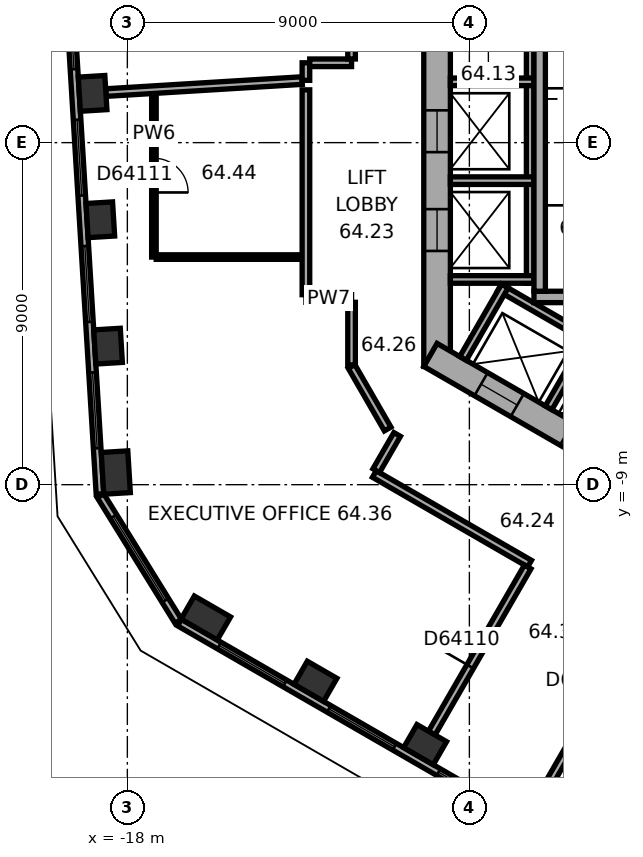
"""IFC4 building model, lengths in metres.
Left out: names, types, materials, properties, quantities, classifications, styles, units other than length and angle.
Written with IfcOpenShell. Run it as: python <this file> out.ifc"""

import sys

from ifc_helpers import new_model, si_unit, direction, frame, frame_2d, origin, origin_2d, place, context, subcontext, project, spatial, rectangle, extrude, element, fill, save


model = new_model("IFC4")
c1 = context("Model", 3, precision=1e-05, world=origin(), true_north=direction((0.0, 1.0)))
c2 = subcontext(c1, "Body", "Model", "MODEL_VIEW")
j1 = project(units=[si_unit("LENGTHUNIT", "METRE"), si_unit("PLANEANGLEUNIT", "RADIAN")], contexts=[c1])
p1 = place(None, origin())
s1 = spatial("IfcSite", under=j1, at=p1, CompositionType="ELEMENT")
p2 = place(p1, origin())
s2 = spatial("IfcBuilding", under=s1, at=p2, CompositionType="ELEMENT")
p3 = place(p2, frame((0.0, 0.0, 259.8)))
s3 = spatial("IfcBuildingStorey", under=s2, at=p3, CompositionType="ELEMENT", Elevation=259.8)
for number, where, z_axis, x_axis in (
    (1, (-18.914, 1.296, 0.0), (0.0, 0.0, 1.0), (0.061, -0.998, 0.0)),
    (2, (-18.711, -2.03, 0.0), (0.0, 0.0, 1.0), (0.061, -0.998, 0.0)),
    (3, (-18.508, -5.355, 0.0), (0.0, 0.0, 1.0), (0.061, -0.998, 0.0)),
):
    element("IfcColumn", number, at=place(p3, frame(where, z_axis=z_axis, x_axis=x_axis)), inside=s3, PredefinedType="COLUMN", context=c2, shape_type="SweptSolid", body=[
        extrude(rectangle(XDim=0.9, YDim=0.7, at=origin_2d()), origin(), (0.0, 0.0, 1.0), 3.7),
    ])
for number, where, z_axis, x_axis in (
    (4, (-18.304, -8.68, 0.0), (0.0, 0.0, 1.0), (0.061, -0.998, 0.0)),
    (5, (-15.936, -12.508, 0.0), (0.0, 0.0, 1.0), (0.866, -0.5, 0.0)),
):
    element("IfcColumn", number, at=place(p3, frame(where, z_axis=z_axis, x_axis=x_axis)), inside=s3, PredefinedType="COLUMN", context=c2, shape_type="SweptSolid", body=[
        extrude(rectangle(XDim=1.1, YDim=0.7, at=origin_2d()), origin(), (0.0, 0.0, 1.0), 3.7),
    ])
for number, where, z_axis, x_axis in (
    (6, (-13.05, -14.174, 0.0), (0.0, 0.0, 1.0), (0.866, -0.5, 0.0)),
    (7, (-10.165, -15.84, 0.0), (0.0, 0.0, 1.0), (0.866, -0.5, 0.0)),
):
    element("IfcColumn", number, at=place(p3, frame(where, z_axis=z_axis, x_axis=x_axis)), inside=s3, PredefinedType="COLUMN", context=c2, shape_type="SweptSolid", body=[
        extrude(rectangle(XDim=0.9, YDim=0.7, at=origin_2d()), origin(), (0.0, 0.0, 1.0), 3.7),
    ])
p4 = place(p3, frame((-9.85, 5.889, 0.0), z_axis=(0.0, 0.0, 1.0), x_axis=(0.0, -1.0, 0.0)))
e8 = element("IfcWall", 8, at=p4, inside=s3, PredefinedType="SHEAR", context=c2, shape_type="SweptSolid", body=[
    extrude(rectangle(XDim=11.778, YDim=0.7, at=frame_2d((5.889, 0.0))), origin(), (0.0, 0.0, 1.0), 3.7),
])
p5 = place(p4, frame((5.039, 0.0, 0.0)))
e9 = element("IfcOpeningElement", 9, at=p5, cuts=e8, PredefinedType="OPENING", context=c2, shape_type="SweptSolid", body=[
    extrude(rectangle(XDim=1.1, YDim=2.1, at=frame_2d((0.55, 1.05))), frame((0.0, 0.36, 0.0), z_axis=(0.0, -1.0, 0.0), x_axis=(1.0, 0.0, 0.0)), (0.0, 0.0, 1.0), 0.72),
])
p6 = place(p4, frame((7.639, 0.0, 0.0)))
e10 = element("IfcOpeningElement", 10, at=p6, cuts=e8, PredefinedType="OPENING", context=c2, shape_type="SweptSolid", body=[
    extrude(rectangle(XDim=1.1, YDim=2.1, at=frame_2d((0.55, 1.05))), frame((0.0, 0.36, 0.0), z_axis=(0.0, -1.0, 0.0), x_axis=(1.0, 0.0, 0.0)), (0.0, 0.0, 1.0), 0.72),
])
p7 = place(p3, frame((-10.025, -5.586, 0.0), z_axis=(0.0, 0.0, 1.0), x_axis=(0.866026453023, -0.499998182661, 0.0)))
e11 = element("IfcWall", 11, at=p7, inside=s3, PredefinedType="SHEAR", context=c2, shape_type="SweptSolid", body=[
    extrude(rectangle(XDim=11.778, YDim=0.7, at=frame_2d((5.889, 0.0))), origin(), (0.0, 0.0, 1.0), 3.7),
])
p8 = place(p7, frame((6.089, 0.0, 0.0)))
e12 = element("IfcOpeningElement", 12, at=p8, cuts=e11, PredefinedType="OPENING", context=c2, shape_type="SweptSolid", body=[
    extrude(rectangle(XDim=1.5, YDim=2.1, at=frame_2d((0.75, 1.05))), frame((0.0, 0.36, 0.0), z_axis=(0.0, -1.0, 0.0), x_axis=(1.0, 0.0, 0.0)), (0.0, 0.0, 1.0), 0.72),
])
p9 = place(p7, frame((1.539, 0.0, 0.0)))
e13 = element("IfcOpeningElement", 13, at=p9, cuts=e11, PredefinedType="OPENING", context=c2, shape_type="SweptSolid", body=[
    extrude(rectangle(XDim=1.1, YDim=2.1, at=frame_2d((0.55, 1.05))), frame((0.0, 0.36, 0.0), z_axis=(0.0, -1.0, 0.0), x_axis=(1.0, 0.0, 0.0)), (0.0, 0.0, 1.0), 0.72),
])
p10 = place(p7, frame((4.139, 0.0, 0.0)))
e14 = element("IfcOpeningElement", 14, at=p10, cuts=e11, PredefinedType="OPENING", context=c2, shape_type="SweptSolid", body=[
    extrude(rectangle(XDim=1.1, YDim=2.1, at=frame_2d((0.55, 1.05))), frame((0.0, 0.36, 0.0), z_axis=(0.0, -1.0, 0.0), x_axis=(1.0, 0.0, 0.0)), (0.0, 0.0, 1.0), 0.72),
])
p11 = place(p3, frame((-19.803, 8.454, 0.0), z_axis=(0.0, 0.0, 1.0), x_axis=(0.061036717565, -0.998135521414, 0.0)))
e15 = element("IfcWall", 15, at=p11, inside=s3, PredefinedType="STANDARD", context=c2, shape_type="SweptSolid", body=[
    extrude(rectangle(XDim=17.731, YDim=0.2, at=frame_2d((8.866, 0.0))), origin(), (0.0, 0.0, 1.0), 3.7),
])
p12 = place(p11, frame((1.202, 0.0, 0.9)))
e16 = element("IfcOpeningElement", 16, at=p12, cuts=e15, PredefinedType="OPENING", context=c2, shape_type="SweptSolid", body=[
    extrude(rectangle(XDim=2.0, YDim=2.0, at=frame_2d((1.0, 1.0))), frame((0.0, 0.11, 0.0), z_axis=(0.0, -1.0, 0.0), x_axis=(1.0, 0.0, 0.0)), (0.0, 0.0, 1.0), 0.22),
])
p13 = place(p11, frame((4.533, 0.0, 0.9)))
e17 = element("IfcOpeningElement", 17, at=p13, cuts=e15, PredefinedType="OPENING", context=c2, shape_type="SweptSolid", body=[
    extrude(rectangle(XDim=2.0, YDim=2.0, at=frame_2d((1.0, 1.0))), frame((0.0, 0.11, 0.0), z_axis=(0.0, -1.0, 0.0), x_axis=(1.0, 0.0, 0.0)), (0.0, 0.0, 1.0), 0.22),
])
p14 = place(p11, frame((7.865, 0.0, 0.9)))
e18 = element("IfcOpeningElement", 18, at=p14, cuts=e15, PredefinedType="OPENING", context=c2, shape_type="SweptSolid", body=[
    extrude(rectangle(XDim=2.0, YDim=2.0, at=frame_2d((1.0, 1.0))), frame((0.0, 0.11, 0.0), z_axis=(0.0, -1.0, 0.0), x_axis=(1.0, 0.0, 0.0)), (0.0, 0.0, 1.0), 0.22),
])
p15 = place(p11, frame((11.197, 0.0, 0.9)))
e19 = element("IfcOpeningElement", 19, at=p15, cuts=e15, PredefinedType="OPENING", context=c2, shape_type="SweptSolid", body=[
    extrude(rectangle(XDim=2.0, YDim=2.0, at=frame_2d((1.0, 1.0))), frame((0.0, 0.11, 0.0), z_axis=(0.0, -1.0, 0.0), x_axis=(1.0, 0.0, 0.0)), (0.0, 0.0, 1.0), 0.22),
])
p16 = place(p11, frame((14.528, 0.0, 0.9)))
e20 = element("IfcOpeningElement", 20, at=p16, cuts=e15, PredefinedType="OPENING", context=c2, shape_type="SweptSolid", body=[
    extrude(rectangle(XDim=2.0, YDim=2.0, at=frame_2d((1.0, 1.0))), frame((0.0, 0.11, 0.0), z_axis=(0.0, -1.0, 0.0), x_axis=(1.0, 0.0, 0.0)), (0.0, 0.0, 1.0), 0.22),
])
p17 = place(p3, frame((-18.706, -9.291, 0.0), z_axis=(0.0, 0.0, 1.0), x_axis=(0.526209683648, -0.850354848775, 0.0)))
e21 = element("IfcWall", 21, at=p17, inside=s3, PredefinedType="STANDARD", context=c2, shape_type="SweptSolid", body=[
    extrude(rectangle(XDim=3.886, YDim=0.2, at=frame_2d((1.943, 0.0))), origin(), (0.0, 0.0, 1.0), 3.7),
])
p18 = place(p17, frame((0.643, 0.0, 0.9)))
e22 = element("IfcOpeningElement", 22, at=p18, cuts=e21, PredefinedType="OPENING", context=c2, shape_type="SweptSolid", body=[
    extrude(rectangle(XDim=2.6, YDim=2.0, at=frame_2d((1.3, 1.0))), frame((0.0, 0.11, 0.0), z_axis=(0.0, -1.0, 0.0), x_axis=(1.0, 0.0, 0.0)), (0.0, 0.0, 1.0), 0.22),
])
p19 = place(p3, frame((-16.626, -12.629, 0.0), z_axis=(0.0, 0.0, 1.0), x_axis=(0.866026460444, -0.499998169808, 0.0)))
e23 = element("IfcWall", 23, at=p19, inside=s3, PredefinedType="STANDARD", context=c2, shape_type="SweptSolid", body=[
    extrude(rectangle(XDim=17.731, YDim=0.2, at=frame_2d((8.866, 0.0))), origin(), (0.0, 0.0, 1.0), 3.7),
])
p20 = place(p19, frame((1.203, 0.0, 0.9)))
e24 = element("IfcOpeningElement", 24, at=p20, cuts=e23, PredefinedType="OPENING", context=c2, shape_type="SweptSolid", body=[
    extrude(rectangle(XDim=2.0, YDim=2.0, at=frame_2d((1.0, 1.0))), frame((0.0, 0.11, 0.0), z_axis=(0.0, -1.0, 0.0), x_axis=(1.0, 0.0, 0.0)), (0.0, 0.0, 1.0), 0.22),
])
p21 = place(p19, frame((4.535, 0.0, 0.9)))
e25 = element("IfcOpeningElement", 25, at=p21, cuts=e23, PredefinedType="OPENING", context=c2, shape_type="SweptSolid", body=[
    extrude(rectangle(XDim=2.0, YDim=2.0, at=frame_2d((1.0, 1.0))), frame((0.0, 0.11, 0.0), z_axis=(0.0, -1.0, 0.0), x_axis=(1.0, 0.0, 0.0)), (0.0, 0.0, 1.0), 0.22),
])
p22 = place(p19, frame((7.867, 0.0, 0.9)))
e26 = element("IfcOpeningElement", 26, at=p22, cuts=e23, PredefinedType="OPENING", context=c2, shape_type="SweptSolid", body=[
    extrude(rectangle(XDim=2.0, YDim=2.0, at=frame_2d((1.0, 1.0))), frame((0.0, 0.11, 0.0), z_axis=(0.0, -1.0, 0.0), x_axis=(1.0, 0.0, 0.0)), (0.0, 0.0, 1.0), 0.22),
])
p23 = place(p19, frame((11.198, 0.0, 0.9)))
e27 = element("IfcOpeningElement", 27, at=p23, cuts=e23, PredefinedType="OPENING", context=c2, shape_type="SweptSolid", body=[
    extrude(rectangle(XDim=2.0, YDim=2.0, at=frame_2d((1.0, 1.0))), frame((0.0, 0.11, 0.0), z_axis=(0.0, -1.0, 0.0), x_axis=(1.0, 0.0, 0.0)), (0.0, 0.0, 1.0), 0.22),
])
p24 = place(p19, frame((14.53, 0.0, 0.9)))
e28 = element("IfcOpeningElement", 28, at=p24, cuts=e23, PredefinedType="OPENING", context=c2, shape_type="SweptSolid", body=[
    extrude(rectangle(XDim=2.0, YDim=2.0, at=frame_2d((1.0, 1.0))), frame((0.0, 0.11, 0.0), z_axis=(0.0, -1.0, 0.0), x_axis=(1.0, 0.0, 0.0)), (0.0, 0.0, 1.0), 0.22),
])
p25 = place(p3, frame((-7.4, 4.3, 0.0), z_axis=(0.0, 0.0, 1.0), x_axis=(0.0, -1.0, 0.0)))
e29 = element("IfcWall", 29, at=p25, inside=s3, PredefinedType="PARTITIONING", context=c2, shape_type="SweptSolid", body=[
    extrude(rectangle(XDim=8.0, YDim=0.2, at=frame_2d((4.0, 0.0))), origin(), (0.0, 0.0, 1.0), 3.42),
])
for number, where, z_axis, x_axis in (
    (30, (-7.3, 1.6, 0.0), (0.0, 0.0, 1.0), (-1.0, 0.0, 0.0)),
    (31, (-7.3, -1.0, 0.0), (0.0, 0.0, 1.0), (-1.0, 0.0, 0.0)),
    (32, (-7.3, -3.6, 0.0), (0.0, 0.0, 1.0), (-1.0, 0.0, 0.0)),
):
    element("IfcWall", number, at=place(p3, frame(where, z_axis=z_axis, x_axis=x_axis)), inside=s3, PredefinedType="PARTITIONING", context=c2, shape_type="SweptSolid", body=[
        extrude(rectangle(XDim=2.2, YDim=0.2, at=frame_2d((1.1, 0.0))), origin(), (0.0, 0.0, 1.0), 3.42),
    ])
p26 = place(p3, frame((-8.203, -3.809, 0.0), z_axis=(0.0, 0.0, 1.0), x_axis=(0.866028230842, -0.499995103361, 0.0)))
e33 = element("IfcWall", 33, at=p26, inside=s3, PredefinedType="PARTITIONING", context=c2, shape_type="SweptSolid", body=[
    extrude(rectangle(XDim=5.4, YDim=0.2, at=frame_2d((2.7, 0.0))), origin(), (0.0, 0.0, 1.0), 3.42),
])
for number, where, z_axis, x_axis in (
    (34, (-8.067, -3.772, 0.0), (0.0, 0.0, 1.0), (-0.5, -0.866, 0.0)),
    (35, (-5.815, -5.072, 0.0), (0.0, 0.0, 1.0), (-0.5, -0.866, 0.0)),
):
    element("IfcWall", number, at=place(p3, frame(where, z_axis=z_axis, x_axis=x_axis)), inside=s3, PredefinedType="PARTITIONING", context=c2, shape_type="SweptSolid", body=[
        extrude(rectangle(XDim=2.2, YDim=0.2, at=frame_2d((1.1, 0.0))), origin(), (0.0, 0.0, 1.0), 3.42),
    ])
p27 = place(p3, frame((-2.6, -4.06, 0.0), z_axis=(0.0, 0.0, 1.0), x_axis=(-1.0, 0.0, 0.0)))
e36 = element("IfcWall", 36, at=p27, inside=s3, PredefinedType="SHEAR", context=c2, shape_type="SweptSolid", body=[
    extrude(rectangle(XDim=4.7, YDim=0.3, at=frame_2d((2.35, 0.0))), origin(), (0.0, 0.0, 1.0), 3.42),
])
p28 = place(p3, frame((-7.15, 3.15, 0.0), z_axis=(0.0, 0.0, 1.0), x_axis=(0.0, -1.0, 0.0)))
e37 = element("IfcWall", 37, at=p28, inside=s3, PredefinedType="SHEAR", context=c2, shape_type="SweptSolid", body=[
    extrude(rectangle(XDim=7.06, YDim=0.3, at=frame_2d((3.53, 0.0))), origin(), (0.0, 0.0, 1.0), 3.42),
])
p29 = place(p3, frame((-18.565, 1.317, 0.0), z_axis=(0.0, 0.0, 1.0), x_axis=(0.998136844425, 0.061015078472, 0.0)))
e38 = element("IfcWall", 38, at=p29, inside=s3, PredefinedType="PARTITIONING", context=c2, shape_type="SweptSolid", body=[
    extrude(rectangle(XDim=5.174, YDim=0.2, at=frame_2d((2.587, 0.0))), origin(), (0.0, 0.0, 1.0), 2.87),
])
p30 = place(p3, frame((-17.301, -3.011, 0.0), z_axis=(0.0, 0.0, 1.0), x_axis=(0.0, 1.0, 0.0)))
e39 = element("IfcWall", 39, at=p30, inside=s3, PredefinedType="PARTITIONING", context=c2, shape_type="SweptSolid", body=[
    extrude(rectangle(XDim=4.3, YDim=0.12, at=frame_2d((2.15, 0.0))), origin(), (0.0, 0.0, 1.0), 3.42),
])
p31 = place(p30, frame((1.7, 0.0, 0.0)))
e40 = element("IfcOpeningElement", 40, at=p31, cuts=e39, PredefinedType="OPENING", context=c2, shape_type="SweptSolid", body=[
    extrude(rectangle(XDim=0.9, YDim=2.1, at=frame_2d((0.45, 1.05))), frame((0.0, 0.07, 0.0), z_axis=(0.0, -1.0, 0.0), x_axis=(1.0, 0.0, 0.0)), (0.0, 0.0, 1.0), 0.14),
])
p32 = place(p3, frame((-13.401, -3.011, 0.0), z_axis=(0.0, 0.0, 1.0), x_axis=(-1.0, 0.0, 0.0)))
e41 = element("IfcWall", 41, at=p32, inside=s3, PredefinedType="PARTITIONING", context=c2, shape_type="SweptSolid", body=[
    extrude(rectangle(XDim=3.84, YDim=0.12, at=frame_2d((1.92, 0.0))), origin(), (0.0, 0.0, 1.0), 3.42),
])
p33 = place(p3, frame((-13.301, -4.101, 0.0), z_axis=(0.0, 0.0, 1.0), x_axis=(1.0, 0.0, 0.0)))
e42 = element("IfcWall", 42, at=p33, inside=s3, PredefinedType="PARTITIONING", context=c2, shape_type="SweptSolid", body=[
    extrude(rectangle(XDim=1.201, YDim=0.2, at=frame_2d((0.601, 0.0))), origin(), (0.0, 0.0, 1.0), 3.42),
])
p34 = place(p3, frame((-13.301, 1.389, 0.0), z_axis=(0.0, 0.0, 1.0), x_axis=(0.0, -1.0, 0.0)))
e43 = element("IfcWall", 43, at=p34, inside=s3, PredefinedType="PARTITIONING", context=c2, shape_type="SweptSolid", body=[
    extrude(rectangle(XDim=5.39, YDim=0.2, at=frame_2d((2.695, 0.0))), origin(), (0.0, 0.0, 1.0), 3.42),
])
p35 = place(p3, frame((-13.301, 2.101, 0.0), z_axis=(0.0, 0.0, 1.0), x_axis=(0.0, -1.0, 0.0)))
e44 = element("IfcWall", 44, at=p35, inside=s3, PredefinedType="PARTITIONING", context=c2, shape_type="SweptSolid", body=[
    extrude(rectangle(XDim=0.462, YDim=0.2, at=frame_2d((0.231, 0.0))), origin(), (0.0, 0.0, 1.0), 3.42),
])
p36 = place(p3, frame((-12.1, -5.889, 0.0), z_axis=(0.0, 0.0, 1.0), x_axis=(0.500063520245, -0.865988727248, 0.0)))
e45 = element("IfcWall", 45, at=p36, inside=s3, PredefinedType="PARTITIONING", context=c2, shape_type="SweptSolid", body=[
    extrude(rectangle(XDim=1.9, YDim=0.2, at=frame_2d((0.95, 0.0))), origin(), (0.0, 0.0, 1.0), 3.42),
])
p37 = place(p3, frame((-12.1, -4.201, 0.0), z_axis=(0.0, 0.0, 1.0), x_axis=(0.0, -1.0, 0.0)))
e46 = element("IfcWall", 46, at=p37, inside=s3, PredefinedType="PARTITIONING", context=c2, shape_type="SweptSolid", body=[
    extrude(rectangle(XDim=1.648, YDim=0.2, at=frame_2d((0.824, 0.0))), origin(), (0.0, 0.0, 1.0), 3.42),
])
p38 = place(p3, frame((-12.1, 2.101, 0.0), z_axis=(0.0, 0.0, 1.0), x_axis=(-1.0, 0.0, 0.0)))
e47 = element("IfcWall", 47, at=p38, inside=s3, PredefinedType="PARTITIONING", context=c2, shape_type="SweptSolid", body=[
    extrude(rectangle(XDim=1.101, YDim=0.2, at=frame_2d((0.55, 0.0))), origin(), (0.0, 0.0, 1.0), 3.42),
])
p39 = place(p3, frame((-12.1, 5.889, 0.0), z_axis=(0.0, 0.0, 1.0), x_axis=(0.0, -1.0, 0.0)))
e48 = element("IfcWall", 48, at=p39, inside=s3, PredefinedType="PARTITIONING", context=c2, shape_type="SweptSolid", body=[
    extrude(rectangle(XDim=3.688, YDim=0.2, at=frame_2d((1.844, 0.0))), origin(), (0.0, 0.0, 1.0), 3.42),
])
p40 = place(p39, frame((1.763, 0.0, 0.0)))
e49 = element("IfcOpeningElement", 49, at=p40, cuts=e48, PredefinedType="OPENING", context=c2, shape_type="SweptSolid", body=[
    extrude(rectangle(XDim=1.0, YDim=2.1, at=frame_2d((0.5, 1.05))), frame((0.0, 0.11, 0.0), z_axis=(0.0, -1.0, 0.0), x_axis=(1.0, 0.0, 0.0)), (0.0, 0.0, 1.0), 0.22),
])
p41 = place(p3, frame((-11.501, -8.719, 0.0), z_axis=(0.0, 0.0, 1.0), x_axis=(0.866024434742, -0.500001678427, 0.0)))
e50 = element("IfcWall", 50, at=p41, inside=s3, PredefinedType="PARTITIONING", context=c2, shape_type="SweptSolid", body=[
    extrude(rectangle(XDim=4.718, YDim=0.2, at=frame_2d((2.359, 0.0))), origin(), (0.0, 0.0, 1.0), 3.42),
])
p42 = place(p3, frame((-10.901, -7.678, 0.0), z_axis=(0.0, 0.0, 1.0), x_axis=(-0.500074377092, -0.865982457891, 0.0)))
e51 = element("IfcWall", 51, at=p42, inside=s3, PredefinedType="PARTITIONING", context=c2, shape_type="SweptSolid", body=[
    extrude(rectangle(XDim=1.101, YDim=0.2, at=frame_2d((0.55, 0.0))), origin(), (0.0, 0.0, 1.0), 3.42),
])
p43 = place(p3, frame((-9.99, -15.537, 0.0), z_axis=(0.0, 0.0, 1.0), x_axis=(0.499966611936, 0.866044679534, 0.0)))
e52 = element("IfcWall", 52, at=p43, inside=s3, PredefinedType="PARTITIONING", context=c2, shape_type="SweptSolid", body=[
    extrude(rectangle(XDim=5.049, YDim=0.2, at=frame_2d((2.524, 0.0))), origin(), (0.0, 0.0, 1.0), 2.87),
])
p44 = place(p43, frame((2.024, 0.0, 0.0)))
e53 = element("IfcOpeningElement", 53, at=p44, cuts=e52, PredefinedType="OPENING", context=c2, shape_type="SweptSolid", body=[
    extrude(rectangle(XDim=1.0, YDim=2.1, at=frame_2d((0.5, 1.05))), frame((0.0, 0.11, 0.0), z_axis=(0.0, -1.0, 0.0), x_axis=(1.0, 0.0, 0.0)), (0.0, 0.0, 1.0), 0.22),
])
p45 = place(p3, frame((-7.105, -17.202, 0.0), z_axis=(0.0, 0.0, 1.0), x_axis=(0.499988692146, 0.866031932279, 0.0)))
e54 = element("IfcWall", 54, at=p45, inside=s3, PredefinedType="PARTITIONING", context=c2, shape_type="SweptSolid", body=[
    extrude(rectangle(XDim=6.35, YDim=0.2, at=frame_2d((3.175, 0.0))), origin(), (0.0, 0.0, 1.0), 3.42),
])
p46 = place(p45, frame((2.675, 0.0, 0.0)))
e55 = element("IfcOpeningElement", 55, at=p46, cuts=e54, PredefinedType="OPENING", context=c2, shape_type="SweptSolid", body=[
    extrude(rectangle(XDim=1.0, YDim=2.1, at=frame_2d((0.5, 1.05))), frame((0.0, 0.11, 0.0), z_axis=(0.0, -1.0, 0.0), x_axis=(1.0, 0.0, 0.0)), (0.0, 0.0, 1.0), 0.22),
])
p47 = place(p13, origin())
e56 = element("IfcWindow", 56, at=p47, inside=s3, PartitioningType="SINGLE_PANEL", PredefinedType="WINDOW", context=c2, shape_type="SweptSolid", body=[
    extrude(rectangle(XDim=2.0, YDim=2.0, at=frame_2d((1.0, 1.0))), frame((0.0, 0.03, 0.0), z_axis=(0.0, -1.0, 0.0), x_axis=(1.0, 0.0, 0.0)), (0.0, 0.0, 1.0), 0.06),
])
fill(e17, e56)
p48 = place(p14, origin())
e57 = element("IfcWindow", 57, at=p48, inside=s3, PartitioningType="SINGLE_PANEL", PredefinedType="WINDOW", context=c2, shape_type="SweptSolid", body=[
    extrude(rectangle(XDim=2.0, YDim=2.0, at=frame_2d((1.0, 1.0))), frame((0.0, 0.03, 0.0), z_axis=(0.0, -1.0, 0.0), x_axis=(1.0, 0.0, 0.0)), (0.0, 0.0, 1.0), 0.06),
])
fill(e18, e57)
p49 = place(p15, origin())
e58 = element("IfcWindow", 58, at=p49, inside=s3, PartitioningType="SINGLE_PANEL", PredefinedType="WINDOW", context=c2, shape_type="SweptSolid", body=[
    extrude(rectangle(XDim=2.0, YDim=2.0, at=frame_2d((1.0, 1.0))), frame((0.0, 0.03, 0.0), z_axis=(0.0, -1.0, 0.0), x_axis=(1.0, 0.0, 0.0)), (0.0, 0.0, 1.0), 0.06),
])
fill(e19, e58)
p50 = place(p16, origin())
e59 = element("IfcWindow", 59, at=p50, inside=s3, PartitioningType="SINGLE_PANEL", PredefinedType="WINDOW", context=c2, shape_type="SweptSolid", body=[
    extrude(rectangle(XDim=2.0, YDim=2.0, at=frame_2d((1.0, 1.0))), frame((0.0, 0.03, 0.0), z_axis=(0.0, -1.0, 0.0), x_axis=(1.0, 0.0, 0.0)), (0.0, 0.0, 1.0), 0.06),
])
fill(e20, e59)
p51 = place(p18, origin())
e60 = element("IfcWindow", 60, at=p51, inside=s3, PartitioningType="SINGLE_PANEL", PredefinedType="WINDOW", context=c2, shape_type="SweptSolid", body=[
    extrude(rectangle(XDim=2.6, YDim=2.0, at=frame_2d((1.3, 1.0))), frame((0.0, 0.03, 0.0), z_axis=(0.0, -1.0, 0.0), x_axis=(1.0, 0.0, 0.0)), (0.0, 0.0, 1.0), 0.06),
])
fill(e22, e60)
p52 = place(p20, origin())
e61 = element("IfcWindow", 61, at=p52, inside=s3, PartitioningType="SINGLE_PANEL", PredefinedType="WINDOW", context=c2, shape_type="SweptSolid", body=[
    extrude(rectangle(XDim=2.0, YDim=2.0, at=frame_2d((1.0, 1.0))), frame((0.0, 0.03, 0.0), z_axis=(0.0, -1.0, 0.0), x_axis=(1.0, 0.0, 0.0)), (0.0, 0.0, 1.0), 0.06),
])
fill(e24, e61)
p53 = place(p21, origin())
e62 = element("IfcWindow", 62, at=p53, inside=s3, PartitioningType="SINGLE_PANEL", PredefinedType="WINDOW", context=c2, shape_type="SweptSolid", body=[
    extrude(rectangle(XDim=2.0, YDim=2.0, at=frame_2d((1.0, 1.0))), frame((0.0, 0.03, 0.0), z_axis=(0.0, -1.0, 0.0), x_axis=(1.0, 0.0, 0.0)), (0.0, 0.0, 1.0), 0.06),
])
fill(e25, e62)
p54 = place(p22, origin())
e63 = element("IfcWindow", 63, at=p54, inside=s3, PartitioningType="SINGLE_PANEL", PredefinedType="WINDOW", context=c2, shape_type="SweptSolid", body=[
    extrude(rectangle(XDim=2.0, YDim=2.0, at=frame_2d((1.0, 1.0))), frame((0.0, 0.03, 0.0), z_axis=(0.0, -1.0, 0.0), x_axis=(1.0, 0.0, 0.0)), (0.0, 0.0, 1.0), 0.06),
])
fill(e26, e63)
p55 = place(p5, origin())
e64 = element("IfcDoor", 64, at=p55, inside=s3, OperationType="DOUBLE_DOOR_SLIDING", PredefinedType="DOOR", context=c2, shape_type="SweptSolid", body=[
    extrude(rectangle(XDim=1.1, YDim=2.1, at=frame_2d((0.55, 1.05))), frame((0.0, 0.025, 0.0), z_axis=(0.0, -1.0, 0.0), x_axis=(1.0, 0.0, 0.0)), (0.0, 0.0, 1.0), 0.05),
])
fill(e9, e64)
p56 = place(p6, origin())
e65 = element("IfcDoor", 65, at=p56, inside=s3, OperationType="DOUBLE_DOOR_SLIDING", PredefinedType="DOOR", context=c2, shape_type="SweptSolid", body=[
    extrude(rectangle(XDim=1.1, YDim=2.1, at=frame_2d((0.55, 1.05))), frame((0.0, 0.025, 0.0), z_axis=(0.0, -1.0, 0.0), x_axis=(1.0, 0.0, 0.0)), (0.0, 0.0, 1.0), 0.05),
])
fill(e10, e65)
p57 = place(p9, origin())
e66 = element("IfcDoor", 66, at=p57, inside=s3, OperationType="DOUBLE_DOOR_SLIDING", PredefinedType="DOOR", context=c2, shape_type="SweptSolid", body=[
    extrude(rectangle(XDim=1.1, YDim=2.1, at=frame_2d((0.55, 1.05))), frame((0.0, 0.025, 0.0), z_axis=(0.0, -1.0, 0.0), x_axis=(1.0, 0.0, 0.0)), (0.0, 0.0, 1.0), 0.05),
])
fill(e13, e66)
p58 = place(p44, origin())
e67 = element("IfcDoor", 67, at=p58, inside=s3, OperationType="SINGLE_SWING_LEFT", PredefinedType="DOOR", context=c2, shape_type="SweptSolid", body=[
    extrude(rectangle(XDim=1.0, YDim=2.1, at=frame_2d((0.5, 1.05))), frame((0.0, 0.025, 0.0), z_axis=(0.0, -1.0, 0.0), x_axis=(1.0, 0.0, 0.0)), (0.0, 0.0, 1.0), 0.05),
])
fill(e53, e67)
p59 = place(p31, origin())
e68 = element("IfcDoor", 68, at=p59, inside=s3, OperationType="SINGLE_SWING_LEFT", PredefinedType="DOOR", context=c2, shape_type="SweptSolid", body=[
    extrude(rectangle(XDim=0.9, YDim=2.1, at=frame_2d((0.45, 1.05))), frame((0.0, 0.025, 0.0), z_axis=(0.0, -1.0, 0.0), x_axis=(1.0, 0.0, 0.0)), (0.0, 0.0, 1.0), 0.05),
])
fill(e40, e68)
save(model, sys.argv[1])
